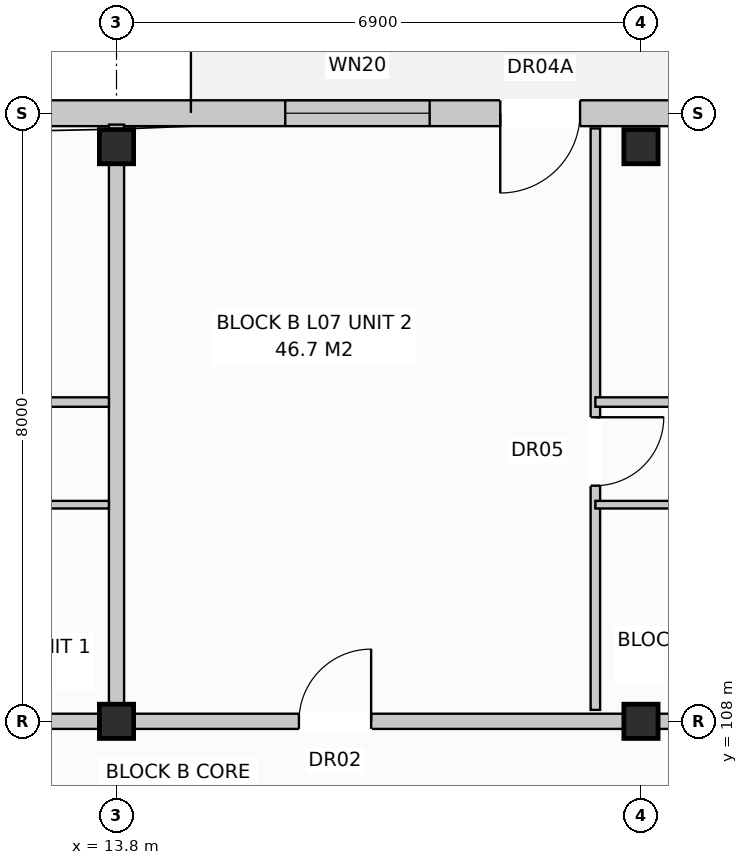
"""IFC4 building model, lengths in metres.
Left out: names, types, materials, properties, quantities, classifications, styles, units other than length and angle.
Written with IfcOpenShell. Run it as: python <this file> out.ifc"""

import sys

from ifc_helpers import new_model, si_unit, direction, frame, frame_2d, origin, origin_with_axes, origin_2d, place, context, subcontext, project, spatial, rectangle, extrude, element, fill, save


model = new_model("IFC4")
c1 = context("Model", 3, precision=1e-05, world=origin(), true_north=direction((0.0, 1.0)))
c2 = subcontext(c1, "Body", "Model", "MODEL_VIEW")
j1 = project(units=[si_unit("LENGTHUNIT", "METRE"), si_unit("PLANEANGLEUNIT", "RADIAN")], contexts=[c1])
p1 = place(None, origin())
s1 = spatial("IfcSite", under=j1, at=p1, CompositionType="ELEMENT")
p2 = place(p1, origin())
s2 = spatial("IfcBuilding", under=s1, at=p2, CompositionType="ELEMENT")
p3 = place(p2, frame((0.0, 0.0, 24.0)))
s3 = spatial("IfcBuildingStorey", under=s2, at=p3, CompositionType="ELEMENT", Elevation=24.0)
for number, where, z_axis, x_axis in (
    (1, (13.8, 108.0, 0.0), (0.0, 0.0, 1.0), (1.0, 0.0, 0.0)),
    (2, (13.8, 115.56, 0.0), (0.0, 0.0, 1.0), (1.0, 0.0, 0.0)),
    (3, (20.7, 108.0, 0.0), (0.0, 0.0, 1.0), (1.0, 0.0, 0.0)),
    (4, (20.7, 115.56, 0.0), (0.0, 0.0, 1.0), (1.0, 0.0, 0.0)),
):
    element("IfcColumn", number, at=place(p3, frame(where, z_axis=z_axis, x_axis=x_axis)), inside=s3, PredefinedType="COLUMN", context=c2, shape_type="SweptSolid", body=[
        extrude(rectangle(XDim=0.45, YDim=0.45, at=origin_2d()), origin(), (0.0, 0.0, 1.0), 3.2),
    ])
p4 = place(p3, frame((0.16, 116.0, 0.0), z_axis=(0.0, 0.0, 1.0), x_axis=(1.0, 0.0, 0.0)))
e5 = element("IfcWall", 5, at=p4, inside=s3, PredefinedType="STANDARD", context=c2, shape_type="SweptSolid", body=[
    extrude(rectangle(XDim=41.08, YDim=0.34, at=frame_2d((20.54, 0.0))), origin(), (0.0, 0.0, 1.0), 2.95),
])
p5 = place(p4, frame((3.789, 0.0, 0.0)))
e6 = element("IfcOpeningElement", 6, at=p5, cuts=e5, PredefinedType="OPENING", context=c2, shape_type="SweptSolid", body=[
    extrude(rectangle(XDim=1.05, YDim=2.12, at=frame_2d((0.525, 1.06))), frame((0.0, 0.182, 0.0), z_axis=(0.0, -1.0, 0.0), x_axis=(1.0, 0.0, 0.0)), (0.0, 0.0, 1.0), 0.364),
])
p6 = place(p4, frame((18.689, 0.0, 0.0)))
e7 = element("IfcOpeningElement", 7, at=p6, cuts=e5, PredefinedType="OPENING", context=c2, shape_type="SweptSolid", body=[
    extrude(rectangle(XDim=1.05, YDim=2.12, at=frame_2d((0.525, 1.06))), frame((0.0, 0.182, 0.0), z_axis=(0.0, -1.0, 0.0), x_axis=(1.0, 0.0, 0.0)), (0.0, 0.0, 1.0), 0.364),
])
p7 = place(p4, frame((29.089, 0.0, 0.0)))
e8 = element("IfcOpeningElement", 8, at=p7, cuts=e5, PredefinedType="OPENING", context=c2, shape_type="SweptSolid", body=[
    extrude(rectangle(XDim=1.05, YDim=2.12, at=frame_2d((0.525, 1.06))), frame((0.0, 0.182, 0.0), z_axis=(0.0, -1.0, 0.0), x_axis=(1.0, 0.0, 0.0)), (0.0, 0.0, 1.0), 0.364),
])
p8 = place(p4, frame((1.56, 0.0, 0.8)))
e9 = element("IfcOpeningElement", 9, at=p8, cuts=e5, PredefinedType="OPENING", context=c2, shape_type="SweptSolid", body=[
    extrude(rectangle(XDim=1.9, YDim=1.85, at=frame_2d((0.95, 0.925))), frame((0.0, 0.182, 0.0), z_axis=(0.0, -1.0, 0.0), x_axis=(1.0, 0.0, 0.0)), (0.0, 0.0, 1.0), 0.364),
])
p9 = place(p4, frame((7.192, 0.0, 0.8)))
e10 = element("IfcOpeningElement", 10, at=p9, cuts=e5, PredefinedType="OPENING", context=c2, shape_type="SweptSolid", body=[
    extrude(rectangle(XDim=1.95, YDim=1.65, at=frame_2d((0.975, 0.825))), frame((0.0, 0.182, 0.0), z_axis=(0.0, -1.0, 0.0), x_axis=(1.0, 0.0, 0.0)), (0.0, 0.0, 1.0), 0.364),
])
p10 = place(p4, frame((10.86, 0.0, 0.72)))
e11 = element("IfcOpeningElement", 11, at=p10, cuts=e5, PredefinedType="OPENING", context=c2, shape_type="SweptSolid", body=[
    extrude(rectangle(XDim=1.1, YDim=1.5, at=frame_2d((0.55, 0.75))), frame((0.0, 0.182, 0.0), z_axis=(0.0, -1.0, 0.0), x_axis=(1.0, 0.0, 0.0)), (0.0, 0.0, 1.0), 0.364),
])
p11 = place(p4, frame((15.86, 0.0, 0.8)))
e12 = element("IfcOpeningElement", 12, at=p11, cuts=e5, PredefinedType="OPENING", context=c2, shape_type="SweptSolid", body=[
    extrude(rectangle(XDim=1.9, YDim=1.85, at=frame_2d((0.95, 0.925))), frame((0.0, 0.182, 0.0), z_axis=(0.0, -1.0, 0.0), x_axis=(1.0, 0.0, 0.0)), (0.0, 0.0, 1.0), 0.364),
])
p12 = place(p4, frame((21.535, 0.0, 0.8)))
e13 = element("IfcOpeningElement", 13, at=p12, cuts=e5, PredefinedType="OPENING", context=c2, shape_type="SweptSolid", body=[
    extrude(rectangle(XDim=1.95, YDim=1.65, at=frame_2d((0.975, 0.825))), frame((0.0, 0.182, 0.0), z_axis=(0.0, -1.0, 0.0), x_axis=(1.0, 0.0, 0.0)), (0.0, 0.0, 1.0), 0.364),
])
p13 = place(p4, frame((25.61, 0.0, 0.72)))
e14 = element("IfcOpeningElement", 14, at=p13, cuts=e5, PredefinedType="OPENING", context=c2, shape_type="SweptSolid", body=[
    extrude(rectangle(XDim=1.1, YDim=1.5, at=frame_2d((0.55, 0.75))), frame((0.0, 0.182, 0.0), z_axis=(0.0, -1.0, 0.0), x_axis=(1.0, 0.0, 0.0)), (0.0, 0.0, 1.0), 0.364),
])
p14 = place(p4, frame((31.36, 0.0, 0.72)))
e15 = element("IfcOpeningElement", 15, at=p14, cuts=e5, PredefinedType="OPENING", context=c2, shape_type="SweptSolid", body=[
    extrude(rectangle(XDim=1.9, YDim=1.85, at=frame_2d((0.95, 0.925))), frame((0.0, 0.182, 0.0), z_axis=(0.0, -1.0, 0.0), x_axis=(1.0, 0.0, 0.0)), (0.0, 0.0, 1.0), 0.364),
])
p15 = place(p4, frame((35.335, 0.0, 0.8)))
e16 = element("IfcOpeningElement", 16, at=p15, cuts=e5, PredefinedType="OPENING", context=c2, shape_type="SweptSolid", body=[
    extrude(rectangle(XDim=1.95, YDim=1.65, at=frame_2d((0.975, 0.825))), frame((0.0, 0.182, 0.0), z_axis=(0.0, -1.0, 0.0), x_axis=(1.0, 0.0, 0.0)), (0.0, 0.0, 1.0), 0.364),
])
p16 = place(p4, frame((39.16, 0.0, 0.72)))
e17 = element("IfcOpeningElement", 17, at=p16, cuts=e5, PredefinedType="OPENING", context=c2, shape_type="SweptSolid", body=[
    extrude(rectangle(XDim=1.1, YDim=1.5, at=frame_2d((0.55, 0.75))), frame((0.0, 0.182, 0.0), z_axis=(0.0, -1.0, 0.0), x_axis=(1.0, 0.0, 0.0)), (0.0, 0.0, 1.0), 0.364),
])
p17 = place(p3, frame((13.8, 108.15, 0.0), z_axis=(0.0, 0.0, 1.0), x_axis=(0.0, 1.0, 0.0)))
e18 = element("IfcWall", 18, at=p17, inside=s3, PredefinedType="PARTITIONING", context=c2, shape_type="SweptSolid", body=[
    extrude(rectangle(XDim=7.7, YDim=0.2, at=frame_2d((3.85, 0.0))), origin(), (0.0, 0.0, 1.0), 2.95),
])
p18 = place(p3, frame((0.0, 108.0, 0.0), z_axis=(0.0, 0.0, 1.0), x_axis=(1.0, 0.0, 0.0)))
e19 = element("IfcWall", 19, at=p18, inside=s3, PredefinedType="PARTITIONING", context=c2, shape_type="SweptSolid", body=[
    extrude(rectangle(XDim=13.8, YDim=0.2, at=frame_2d((6.9, 0.0))), origin(), (0.0, 0.0, 1.0), 2.39),
])
p19 = place(p18, frame((2.4, 0.0, 0.0)))
e20 = element("IfcOpeningElement", 20, at=p19, cuts=e19, PredefinedType="OPENING", context=c2, shape_type="SweptSolid", body=[
    extrude(rectangle(XDim=0.95, YDim=2.15, at=frame_2d((0.475, 1.075))), frame((0.0, 0.112, 0.0), z_axis=(0.0, -1.0, 0.0), x_axis=(1.0, 0.0, 0.0)), (0.0, 0.0, 1.0), 0.224),
])
p20 = place(p3, frame((5.2, 110.85, 0.0), z_axis=(0.0, 0.0, 1.0), x_axis=(1.0, 0.0, 0.0)))
e21 = element("IfcWall", 21, at=p20, inside=s3, PredefinedType="PARTITIONING", context=c2, shape_type="SweptSolid", body=[
    extrude(rectangle(XDim=8.5, YDim=0.1, at=frame_2d((4.25, 0.0))), origin(), (0.0, 0.0, 1.0), 2.95),
])
p21 = place(p20, frame((1.0, 0.0, 0.0)))
e22 = element("IfcOpeningElement", 22, at=p21, cuts=e21, PredefinedType="OPENING", context=c2, shape_type="SweptSolid", body=[
    extrude(rectangle(XDim=0.85, YDim=2.1, at=frame_2d((0.425, 1.05))), frame((0.0, 0.062, 0.0), z_axis=(0.0, -1.0, 0.0), x_axis=(1.0, 0.0, 0.0)), (0.0, 0.0, 1.0), 0.124),
])
p22 = place(p20, frame((3.4, 0.0, 0.0)))
e23 = element("IfcOpeningElement", 23, at=p22, cuts=e21, PredefinedType="OPENING", context=c2, shape_type="SweptSolid", body=[
    extrude(rectangle(XDim=0.85, YDim=2.05, at=frame_2d((0.425, 1.025))), frame((0.0, 0.062, 0.0), z_axis=(0.0, -1.0, 0.0), x_axis=(1.0, 0.0, 0.0)), (0.0, 0.0, 1.0), 0.124),
])
p23 = place(p20, frame((6.2, 0.0, 0.0)))
e24 = element("IfcOpeningElement", 24, at=p23, cuts=e21, PredefinedType="OPENING", context=c2, shape_type="SweptSolid", body=[
    extrude(rectangle(XDim=0.85, YDim=2.05, at=frame_2d((0.425, 1.025))), frame((0.0, 0.062, 0.0), z_axis=(0.0, -1.0, 0.0), x_axis=(1.0, 0.0, 0.0)), (0.0, 0.0, 1.0), 0.124),
])
p24 = place(p3, frame((5.2, 112.2, 0.0), z_axis=(0.0, 0.0, 1.0), x_axis=(1.0, 0.0, 0.0)))
e25 = element("IfcWall", 25, at=p24, inside=s3, PredefinedType="PARTITIONING", context=c2, shape_type="SweptSolid", body=[
    extrude(rectangle(XDim=8.5, YDim=0.125, at=frame_2d((4.25, 0.0))), origin(), (0.0, 0.0, 1.0), 2.95),
])
p25 = place(p24, frame((1.5, 0.0, 0.0)))
e26 = element("IfcOpeningElement", 26, at=p25, cuts=e25, PredefinedType="OPENING", context=c2, shape_type="SweptSolid", body=[
    extrude(rectangle(XDim=0.9, YDim=2.1, at=frame_2d((0.45, 1.05))), frame((0.0, 0.074, 0.0), z_axis=(0.0, -1.0, 0.0), x_axis=(1.0, 0.0, 0.0)), (0.0, 0.0, 1.0), 0.149),
])
p26 = place(p24, frame((5.6, 0.0, 0.0)))
e27 = element("IfcOpeningElement", 27, at=p26, cuts=e25, PredefinedType="OPENING", context=c2, shape_type="SweptSolid", body=[
    extrude(rectangle(XDim=0.9, YDim=2.1, at=frame_2d((0.45, 1.05))), frame((0.0, 0.074, 0.0), z_axis=(0.0, -1.0, 0.0), x_axis=(1.0, 0.0, 0.0)), (0.0, 0.0, 1.0), 0.149),
])
p27 = place(p3, frame((13.8, 108.0, 0.0), z_axis=(0.0, 0.0, 1.0), x_axis=(1.0, 0.0, 0.0)))
e28 = element("IfcWall", 28, at=p27, inside=s3, PredefinedType="PARTITIONING", context=c2, shape_type="SweptSolid", body=[
    extrude(rectangle(XDim=20.7, YDim=0.2, at=frame_2d((10.35, 0.0))), origin(), (0.0, 0.0, 1.0), 2.39),
])
p28 = place(p27, frame((2.4, 0.0, 0.0)))
e29 = element("IfcOpeningElement", 29, at=p28, cuts=e28, PredefinedType="OPENING", context=c2, shape_type="SweptSolid", body=[
    extrude(rectangle(XDim=0.95, YDim=2.15, at=frame_2d((0.475, 1.075))), frame((0.0, 0.112, 0.0), z_axis=(0.0, -1.0, 0.0), x_axis=(1.0, 0.0, 0.0)), (0.0, 0.0, 1.0), 0.224),
])
p29 = place(p3, frame((20.1, 108.15, 0.0), z_axis=(0.0, 0.0, 1.0), x_axis=(0.0, 1.0, 0.0)))
e30 = element("IfcWall", 30, at=p29, inside=s3, PredefinedType="PARTITIONING", context=c2, shape_type="SweptSolid", body=[
    extrude(rectangle(XDim=7.65, YDim=0.125, at=frame_2d((3.825, 0.0))), origin(), (0.0, 0.0, 1.0), 2.95),
])
p30 = place(p29, frame((2.95, 0.0, 0.0)))
e31 = element("IfcOpeningElement", 31, at=p30, cuts=e30, PredefinedType="OPENING", context=c2, shape_type="SweptSolid", body=[
    extrude(rectangle(XDim=0.9, YDim=2.1, at=frame_2d((0.45, 1.05))), frame((0.0, 0.074, 0.0), z_axis=(0.0, -1.0, 0.0), x_axis=(1.0, 0.0, 0.0)), (0.0, 0.0, 1.0), 0.149),
])
p31 = place(p3, frame((20.1, 110.85, 0.0), z_axis=(0.0, 0.0, 1.0), x_axis=(1.0, 0.0, 0.0)))
e32 = element("IfcWall", 32, at=p31, inside=s3, PredefinedType="PARTITIONING", context=c2, shape_type="SweptSolid", body=[
    extrude(rectangle(XDim=14.3, YDim=0.1, at=frame_2d((7.15, 0.0))), origin(), (0.0, 0.0, 1.0), 2.95),
])
p32 = place(p31, frame((1.6, 0.0, 0.0)))
e33 = element("IfcOpeningElement", 33, at=p32, cuts=e32, PredefinedType="OPENING", context=c2, shape_type="SweptSolid", body=[
    extrude(rectangle(XDim=0.9, YDim=2.1, at=frame_2d((0.45, 1.05))), frame((0.0, 0.062, 0.0), z_axis=(0.0, -1.0, 0.0), x_axis=(1.0, 0.0, 0.0)), (0.0, 0.0, 1.0), 0.124),
])
p33 = place(p31, frame((5.1, 0.0, 0.0)))
e34 = element("IfcOpeningElement", 34, at=p33, cuts=e32, PredefinedType="OPENING", context=c2, shape_type="SweptSolid", body=[
    extrude(rectangle(XDim=0.85, YDim=2.05, at=frame_2d((0.425, 1.025))), frame((0.0, 0.062, 0.0), z_axis=(0.0, -1.0, 0.0), x_axis=(1.0, 0.0, 0.0)), (0.0, 0.0, 1.0), 0.124),
])
p34 = place(p31, frame((8.2, 0.0, 0.0)))
e35 = element("IfcOpeningElement", 35, at=p34, cuts=e32, PredefinedType="OPENING", context=c2, shape_type="SweptSolid", body=[
    extrude(rectangle(XDim=0.85, YDim=2.05, at=frame_2d((0.425, 1.025))), frame((0.0, 0.062, 0.0), z_axis=(0.0, -1.0, 0.0), x_axis=(1.0, 0.0, 0.0)), (0.0, 0.0, 1.0), 0.124),
])
p35 = place(p31, frame((11.6, 0.0, 0.0)))
e36 = element("IfcOpeningElement", 36, at=p35, cuts=e32, PredefinedType="OPENING", context=c2, shape_type="SweptSolid", body=[
    extrude(rectangle(XDim=0.85, YDim=2.05, at=frame_2d((0.425, 1.025))), frame((0.0, 0.062, 0.0), z_axis=(0.0, -1.0, 0.0), x_axis=(1.0, 0.0, 0.0)), (0.0, 0.0, 1.0), 0.124),
])
p36 = place(p3, frame((20.1, 112.2, 0.0), z_axis=(0.0, 0.0, 1.0), x_axis=(1.0, 0.0, 0.0)))
e37 = element("IfcWall", 37, at=p36, inside=s3, PredefinedType="PARTITIONING", context=c2, shape_type="SweptSolid", body=[
    extrude(rectangle(XDim=10.4, YDim=0.125, at=frame_2d((5.2, 0.0))), origin(), (0.0, 0.0, 1.0), 2.95),
])
p37 = place(p36, frame((2.0, 0.0, 0.0)))
e38 = element("IfcOpeningElement", 38, at=p37, cuts=e37, PredefinedType="OPENING", context=c2, shape_type="SweptSolid", body=[
    extrude(rectangle(XDim=0.9, YDim=2.1, at=frame_2d((0.45, 1.05))), frame((0.0, 0.074, 0.0), z_axis=(0.0, -1.0, 0.0), x_axis=(1.0, 0.0, 0.0)), (0.0, 0.0, 1.0), 0.149),
])
p38 = place(p36, frame((7.2, 0.0, 0.0)))
e39 = element("IfcOpeningElement", 39, at=p38, cuts=e37, PredefinedType="OPENING", context=c2, shape_type="SweptSolid", body=[
    extrude(rectangle(XDim=0.9, YDim=2.1, at=frame_2d((0.45, 1.05))), frame((0.0, 0.074, 0.0), z_axis=(0.0, -1.0, 0.0), x_axis=(1.0, 0.0, 0.0)), (0.0, 0.0, 1.0), 0.149),
])
p39 = place(p6, frame((1.05, 0.0, 0.0), z_axis=(0.0, 0.0, 1.0), x_axis=(-1.0, 0.0, 0.0)))
e40 = element("IfcDoor", 40, at=p39, inside=s3, OperationType="SINGLE_SWING_LEFT", PredefinedType="DOOR", context=c2, shape_type="SweptSolid", body=[
    extrude(rectangle(XDim=1.05, YDim=2.12, at=frame_2d((0.525, 1.06))), frame((0.0, 0.025, 0.0), z_axis=(0.0, -1.0, 0.0), x_axis=(1.0, 0.0, 0.0)), (0.0, 0.0, 1.0), 0.05),
])
fill(e7, e40)
p40 = place(p11, origin_with_axes())
e41 = element("IfcWindow", 41, at=p40, inside=s3, PartitioningType="SINGLE_PANEL", PredefinedType="WINDOW", context=c2, shape_type="SweptSolid", body=[
    extrude(rectangle(XDim=1.9, YDim=1.85, at=frame_2d((0.95, 0.925))), frame((0.0, 0.03, 0.0), z_axis=(0.0, -1.0, 0.0), x_axis=(1.0, 0.0, 0.0)), (0.0, 0.0, 1.0), 0.06),
])
fill(e12, e41)
p41 = place(p28, origin_with_axes())
e42 = element("IfcDoor", 42, at=p41, inside=s3, OperationType="SINGLE_SWING_RIGHT", PredefinedType="DOOR", context=c2, shape_type="SweptSolid", body=[
    extrude(rectangle(XDim=0.95, YDim=2.15, at=frame_2d((0.475, 1.075))), frame((0.0, 0.025, 0.0), z_axis=(0.0, -1.0, 0.0), x_axis=(1.0, 0.0, 0.0)), (0.0, 0.0, 1.0), 0.05),
])
fill(e29, e42)
p42 = place(p30, frame((0.9, 0.0, 0.0), z_axis=(0.0, 0.0, 1.0), x_axis=(-1.0, 0.0, 0.0)))
e43 = element("IfcDoor", 43, at=p42, inside=s3, OperationType="SINGLE_SWING_RIGHT", PredefinedType="DOOR", context=c2, shape_type="SweptSolid", body=[
    extrude(rectangle(XDim=0.9, YDim=2.1, at=frame_2d((0.45, 1.05))), frame((0.0, 0.025, 0.0), z_axis=(0.0, -1.0, 0.0), x_axis=(1.0, 0.0, 0.0)), (0.0, 0.0, 1.0), 0.05),
])
fill(e31, e43)
save(model, sys.argv[1])
